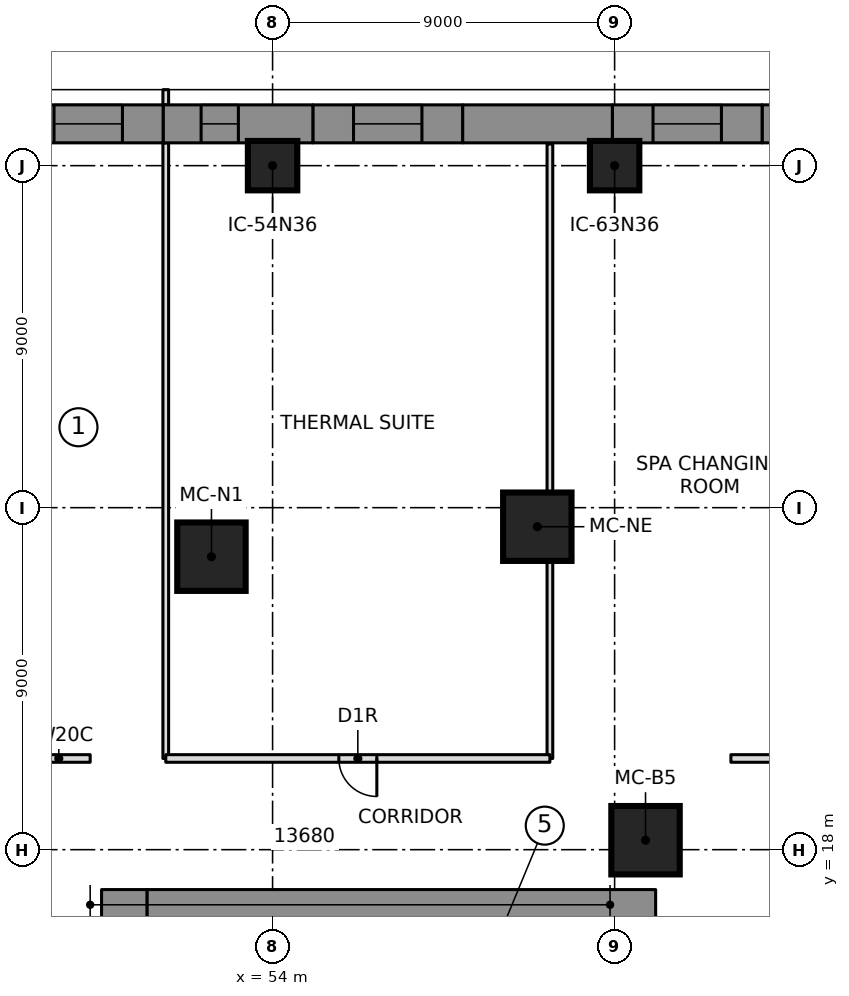
"""IFC4 building model, lengths in metres.
Left out: names, types, materials, properties, quantities, classifications, styles, units other than length and angle.
Written with IfcOpenShell. Run it as: python <this file> out.ifc"""

import sys

from ifc_helpers import new_model, si_unit, direction, frame, frame_2d, origin, origin_2d, place, context, subcontext, project, spatial, polyline, rectangle, outline, extrude, element, fill, save


model = new_model("IFC4")
c1 = context("Model", 3, precision=1e-05, world=origin(), true_north=direction((0.0, 1.0)))
c2 = subcontext(c1, "Body", "Model", "MODEL_VIEW")
j1 = project(units=[si_unit("LENGTHUNIT", "METRE"), si_unit("PLANEANGLEUNIT", "RADIAN")], contexts=[c1])
p1 = place(None, origin())
s1 = spatial("IfcSite", under=j1, at=p1, CompositionType="ELEMENT")
p2 = place(p1, origin())
s2 = spatial("IfcBuilding", under=s1, at=p2, CompositionType="ELEMENT")
p3 = place(p2, frame((0.0, 0.0, 19.0)))
s3 = spatial("IfcBuildingStorey", under=s2, at=p3, CompositionType="ELEMENT", Elevation=19.0)
p4 = place(p3, frame((50.1, 6.65, 0.0), z_axis=(0.0, 0.0, 1.0), x_axis=(0.0, 1.0, 0.0)))
e1 = element("IfcWall", 1, at=p4, inside=s3, PredefinedType="SHEAR", context=c2, shape_type="SweptSolid", body=[
    extrude(rectangle(XDim=10.3, YDim=1.2, at=frame_2d((5.15, 0.0))), origin(), (0.0, 0.0, 1.0), 5.0),
])
p5 = place(p4, frame((6.5, 0.0, 0.0)))
e2 = element("IfcOpeningElement", 2, at=p5, cuts=e1, PredefinedType="OPENING", context=c2, shape_type="SweptSolid", body=[
    extrude(rectangle(XDim=1.1, YDim=2.1, at=frame_2d((0.55, 1.05))), frame((0.0, 0.61, 0.0), z_axis=(0.0, -1.0, 0.0), x_axis=(1.0, 0.0, 0.0)), (0.0, 0.0, 1.0), 1.22),
])
p6 = place(p3, frame((50.7, 16.35, 0.0), z_axis=(0.0, 0.0, 1.0), x_axis=(1.0, 0.0, 0.0)))
e3 = element("IfcWall", 3, at=p6, inside=s3, PredefinedType="SHEAR", context=c2, shape_type="SweptSolid", body=[
    extrude(rectangle(XDim=13.38, YDim=1.2, at=frame_2d((6.69, 0.0))), origin(), (0.0, 0.0, 1.0), 5.0),
])
for number, where, z_axis, x_axis in (
    (4, (63.813, 18.249, 0.0), (0.0, 0.0, 1.0), (1.0, 0.0, 0.0)),
    (5, (60.966, 26.499, 0.0), (0.0, 0.0, 1.0), (1.0, 0.0, 0.0)),
    (6, (52.392, 25.71, 0.0), (0.0, 0.0, 1.0), (1.0, 0.0, 0.0)),
):
    element("IfcColumn", number, at=place(p3, frame(where, z_axis=z_axis, x_axis=x_axis)), inside=s3, PredefinedType="COLUMN", context=c2, shape_type="SweptSolid", body=[
        extrude(rectangle(XDim=1.8, YDim=1.8, at=origin_2d()), origin(), (0.0, 0.0, 1.0), 5.0),
    ])
for number, where, z_axis, x_axis in (
    (7, (54.0, 36.0, 0.0), (0.0, 0.0, 1.0), (1.0, 0.0, 0.0)),
    (8, (63.0, 36.0, 0.0), (0.0, 0.0, 1.0), (1.0, 0.0, 0.0)),
):
    element("IfcColumn", number, at=place(p3, frame(where, z_axis=z_axis, x_axis=x_axis)), inside=s3, PredefinedType="COLUMN", context=c2, shape_type="SweptSolid", body=[
        extrude(rectangle(XDim=1.3, YDim=1.3, at=origin_2d()), origin(), (0.0, 0.0, 1.0), 5.0),
    ])
p7 = place(p3, frame((70.821, 37.1, 0.0), z_axis=(0.0, 0.0, 1.0), x_axis=(-1.0, 0.0, 0.0)))
e9 = element("IfcWall", 9, at=p7, inside=s3, PredefinedType="NOTDEFINED", context=c2, shape_type="SweptSolid", body=[
    extrude(outline(polyline([(-0.1, -0.5), (3.94, -0.5), (3.94, 0.5), (0.1, 0.5), (-0.1, -0.5)])), origin(), (0.0, 0.0, 1.0), 4.7),
])
p8 = place(p3, frame((66.881, 37.1, 0.0), z_axis=(0.0, 0.0, 1.0), x_axis=(-1.0, 0.0, 0.0)))
e10 = element("IfcWall", 10, at=p8, inside=s3, PredefinedType="NOTDEFINED", context=c2, shape_type="SweptSolid", body=[
    extrude(outline(polyline([(0.0, -0.5), (3.94, -0.5), (3.94, 0.5), (0.0, 0.5), (0.0, -0.5)])), origin(), (0.0, 0.0, 1.0), 4.7),
])
p9 = place(p8, frame((1.07, 0.0, 0.9)))
e11 = element("IfcOpeningElement", 11, at=p9, cuts=e10, PredefinedType="OPENING", context=c2, shape_type="SweptSolid", body=[
    extrude(rectangle(XDim=1.8, YDim=2.4, at=frame_2d((0.9, 1.2))), frame((0.0, 0.51, 0.0), z_axis=(0.0, -1.0, 0.0), x_axis=(1.0, 0.0, 0.0)), (0.0, 0.0, 1.0), 1.02),
])
p10 = place(p3, frame((62.94, 37.1, 0.0), z_axis=(0.0, 0.0, 1.0), x_axis=(-1.0, 0.0, 0.0)))
e12 = element("IfcWall", 12, at=p10, inside=s3, PredefinedType="NOTDEFINED", context=c2, shape_type="SweptSolid", body=[
    extrude(outline(polyline([(0.0, -0.5), (3.94, -0.5), (3.94, 0.5), (0.0, 0.5), (0.0, -0.5)])), origin(), (0.0, 0.0, 1.0), 4.7),
])
p11 = place(p3, frame((59.0, 37.1, 0.0), z_axis=(0.0, 0.0, 1.0), x_axis=(-1.0, 0.0, 0.0)))
e13 = element("IfcWall", 13, at=p11, inside=s3, PredefinedType="NOTDEFINED", context=c2, shape_type="SweptSolid", body=[
    extrude(outline(polyline([(0.0, -0.5), (3.94, -0.5), (3.94, 0.5), (0.0, 0.5), (0.0, -0.5)])), origin(), (0.0, 0.0, 1.0), 4.7),
])
p12 = place(p11, frame((1.07, 0.0, 0.9)))
e14 = element("IfcOpeningElement", 14, at=p12, cuts=e13, PredefinedType="OPENING", context=c2, shape_type="SweptSolid", body=[
    extrude(rectangle(XDim=1.8, YDim=2.4, at=frame_2d((0.9, 1.2))), frame((0.0, 0.51, 0.0), z_axis=(0.0, -1.0, 0.0), x_axis=(1.0, 0.0, 0.0)), (0.0, 0.0, 1.0), 1.02),
])
p13 = place(p3, frame((55.06, 37.1, 0.0), z_axis=(0.0, 0.0, 1.0), x_axis=(-1.0, 0.0, 0.0)))
e15 = element("IfcWall", 15, at=p13, inside=s3, PredefinedType="NOTDEFINED", context=c2, shape_type="SweptSolid", body=[
    extrude(outline(polyline([(0.0, -0.5), (3.94, -0.5), (3.94, 0.5), (0.0, 0.5), (0.0, -0.5)])), origin(), (0.0, 0.0, 1.0), 4.7),
])
p14 = place(p13, frame((1.96, 0.0, 0.9)))
e16 = element("IfcOpeningElement", 16, at=p14, cuts=e15, PredefinedType="OPENING", context=c2, shape_type="SweptSolid", body=[
    extrude(rectangle(XDim=0.981, YDim=2.4, at=frame_2d((0.49, 1.2))), frame((0.0, 0.51, 0.0), z_axis=(0.0, -1.0, 0.0), x_axis=(1.0, 0.0, 0.0)), (0.0, 0.0, 1.0), 1.02),
])
p15 = place(p3, frame((51.119, 37.1, 0.0), z_axis=(0.0, 0.0, 1.0), x_axis=(-1.0, 0.0, 0.0)))
e17 = element("IfcWall", 17, at=p15, inside=s3, PredefinedType="NOTDEFINED", context=c2, shape_type="SweptSolid", body=[
    extrude(outline(polyline([(0.0, -0.5), (4.04, -0.5), (3.841, 0.5), (0.0, 0.5), (0.0, -0.5)])), origin(), (0.0, 0.0, 1.0), 4.7),
])
p16 = place(p15, frame((1.07, 0.0, 0.9)))
e18 = element("IfcOpeningElement", 18, at=p16, cuts=e17, PredefinedType="OPENING", context=c2, shape_type="SweptSolid", body=[
    extrude(rectangle(XDim=1.8, YDim=2.4, at=frame_2d((0.9, 1.2))), frame((0.0, 0.51, 0.0), z_axis=(0.0, -1.0, 0.0), x_axis=(1.0, 0.0, 0.0)), (0.0, 0.0, 1.0), 1.02),
])
p17 = place(p3, frame((51.189, 20.4, 0.0), z_axis=(0.0, 0.0, 1.0), x_axis=(0.0, 1.0, 0.0)))
e19 = element("IfcWall", 19, at=p17, inside=s3, PredefinedType="PARTITIONING", context=c2, shape_type="SweptSolid", body=[
    extrude(rectangle(XDim=16.2, YDim=0.15, at=frame_2d((8.1, 0.0))), origin(), (0.0, 0.0, 1.0), 4.65),
])
p18 = place(p3, frame((51.189, 37.6, 0.0), z_axis=(0.0, 0.0, 1.0), x_axis=(0.0, 1.0, 0.0)))
e20 = element("IfcWall", 20, at=p18, inside=s3, PredefinedType="PARTITIONING", context=c2, shape_type="SweptSolid", body=[
    extrude(rectangle(XDim=0.4, YDim=0.15, at=frame_2d((0.2, 0.0))), origin(), (0.0, 0.0, 1.0), 4.65),
])
p19 = place(p3, frame((61.297, 20.4, 0.0), z_axis=(0.0, 0.0, 1.0), x_axis=(0.0, 1.0, 0.0)))
e21 = element("IfcWall", 21, at=p19, inside=s3, PredefinedType="PARTITIONING", context=c2, shape_type="SweptSolid", body=[
    extrude(rectangle(XDim=16.17, YDim=0.15, at=frame_2d((8.085, 0.0))), origin(), (0.0, 0.0, 1.0), 4.65),
])
p20 = place(p3, frame((61.297, 20.4, 0.0), z_axis=(0.0, 0.0, 1.0), x_axis=(-1.0, 0.0, 0.0)))
e22 = element("IfcWall", 22, at=p20, inside=s3, PredefinedType="PARTITIONING", context=c2, shape_type="SweptSolid", body=[
    extrude(rectangle(XDim=10.108, YDim=0.2, at=frame_2d((5.054, 0.0))), origin(), (0.0, 0.0, 1.0), 4.65),
])
p21 = place(p20, frame((4.554, 0.0, 0.0)))
e23 = element("IfcOpeningElement", 23, at=p21, cuts=e22, PredefinedType="OPENING", context=c2, shape_type="SweptSolid", body=[
    extrude(rectangle(XDim=1.0, YDim=2.1, at=frame_2d((0.5, 1.05))), frame((0.0, 0.11, 0.0), z_axis=(0.0, -1.0, 0.0), x_axis=(1.0, 0.0, 0.0)), (0.0, 0.0, 1.0), 0.22),
])
for number, where, z_axis, x_axis in (
    (24, (47.55, 20.4, 0.0), (0.0, 0.0, 1.0), (1.0, 0.0, 0.0)),
    (25, (66.06, 20.4, 0.0), (0.0, 0.0, 1.0), (1.0, 0.0, 0.0)),
):
    element("IfcWall", number, at=place(p3, frame(where, z_axis=z_axis, x_axis=x_axis)), inside=s3, PredefinedType="PARTITIONING", context=c2, shape_type="SweptSolid", body=[
        extrude(rectangle(XDim=1.65, YDim=0.2, at=frame_2d((0.825, 0.0))), origin(), (0.0, 0.0, 1.0), 4.65),
    ])
p22 = place(p9, origin())
e26 = element("IfcWindow", 26, at=p22, inside=s3, PartitioningType="SINGLE_PANEL", PredefinedType="WINDOW", context=c2, shape_type="SweptSolid", body=[
    extrude(rectangle(XDim=1.8, YDim=2.4, at=frame_2d((0.9, 1.2))), frame((0.0, 0.5, 0.0), z_axis=(0.0, -1.0, 0.0), x_axis=(1.0, 0.0, 0.0)), (0.0, 0.0, 1.0), 0.06),
])
fill(e11, e26)
p23 = place(p12, origin())
e27 = element("IfcWindow", 27, at=p23, inside=s3, PartitioningType="SINGLE_PANEL", PredefinedType="WINDOW", context=c2, shape_type="SweptSolid", body=[
    extrude(rectangle(XDim=1.8, YDim=2.4, at=frame_2d((0.9, 1.2))), frame((0.0, 0.5, 0.0), z_axis=(0.0, -1.0, 0.0), x_axis=(1.0, 0.0, 0.0)), (0.0, 0.0, 1.0), 0.06),
])
fill(e14, e27)
p24 = place(p14, origin())
e28 = element("IfcWindow", 28, at=p24, inside=s3, PartitioningType="SINGLE_PANEL", PredefinedType="WINDOW", context=c2, shape_type="SweptSolid", body=[
    extrude(rectangle(XDim=0.981, YDim=2.4, at=frame_2d((0.49, 1.2))), frame((0.0, 0.5, 0.0), z_axis=(0.0, -1.0, 0.0), x_axis=(1.0, 0.0, 0.0)), (0.0, 0.0, 1.0), 0.06),
])
fill(e16, e28)
p25 = place(p16, origin())
e29 = element("IfcWindow", 29, at=p25, inside=s3, PartitioningType="SINGLE_PANEL", PredefinedType="WINDOW", context=c2, shape_type="SweptSolid", body=[
    extrude(rectangle(XDim=1.8, YDim=2.4, at=frame_2d((0.9, 1.2))), frame((0.0, 0.5, 0.0), z_axis=(0.0, -1.0, 0.0), x_axis=(1.0, 0.0, 0.0)), (0.0, 0.0, 1.0), 0.06),
])
fill(e18, e29)
p26 = place(p21, origin())
e30 = element("IfcDoor", 30, at=p26, inside=s3, OperationType="SINGLE_SWING_RIGHT", PredefinedType="DOOR", context=c2, shape_type="SweptSolid", body=[
    extrude(rectangle(XDim=1.0, YDim=2.1, at=frame_2d((0.5, 1.05))), frame((0.0, 0.025, 0.0), z_axis=(0.0, -1.0, 0.0), x_axis=(1.0, 0.0, 0.0)), (0.0, 0.0, 1.0), 0.05),
])
fill(e23, e30)
save(model, sys.argv[1])
